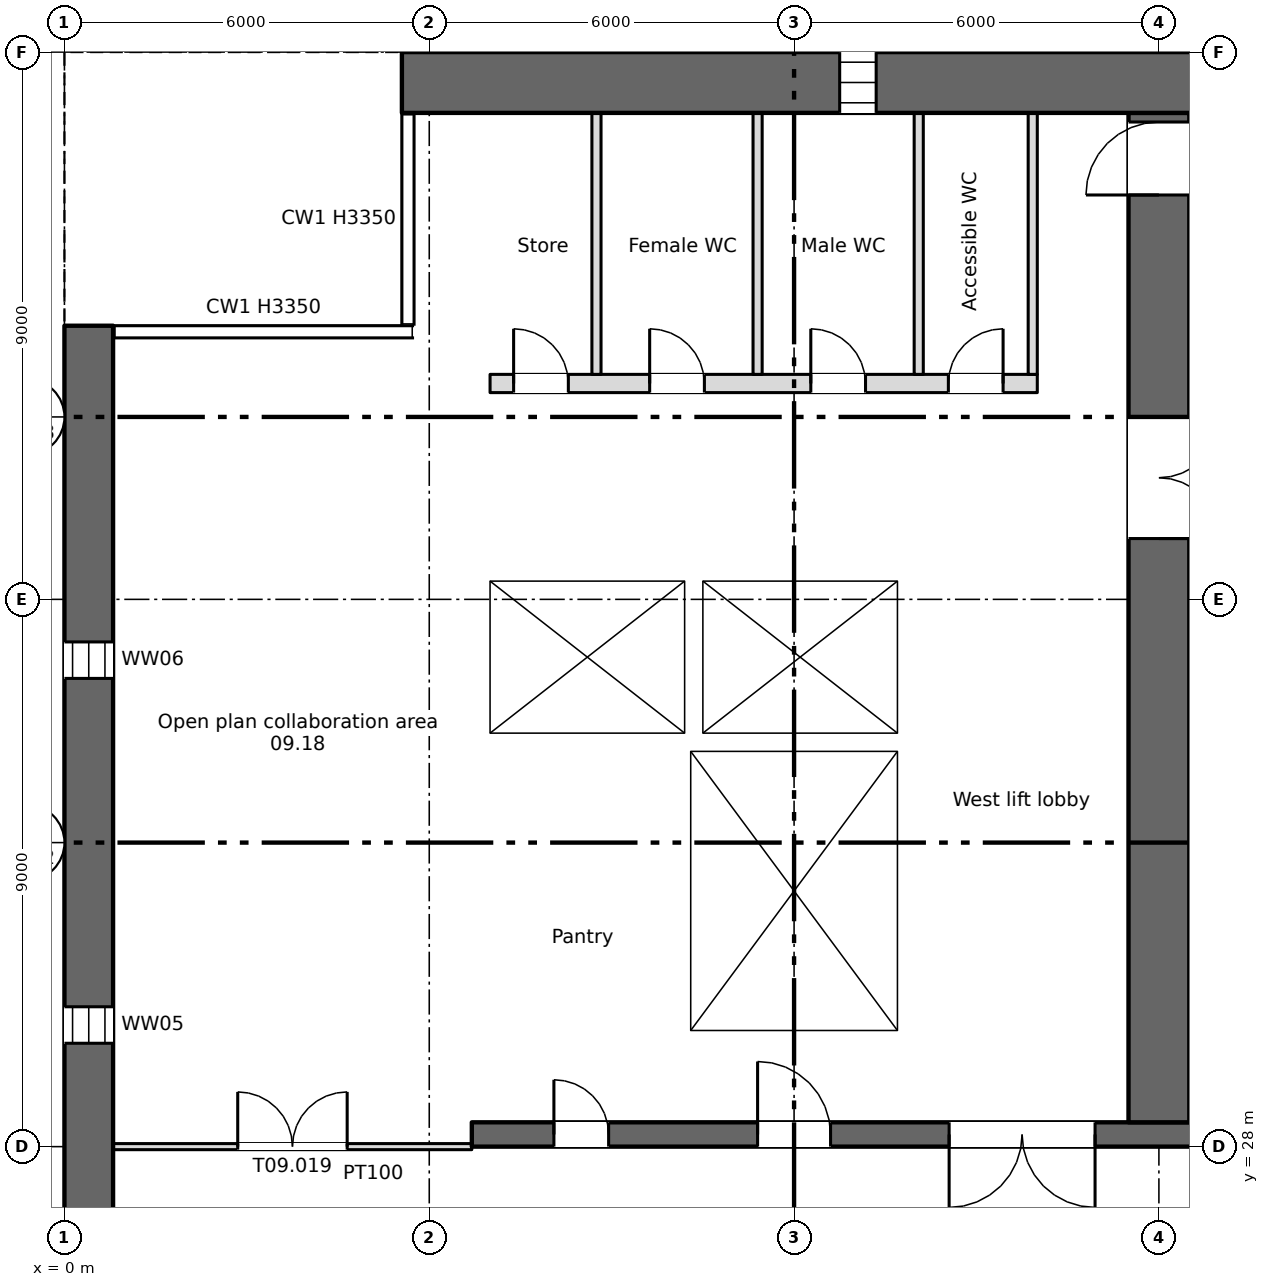
"""IFC4 building model, lengths in metres.
Left out: names, types, materials, properties, quantities, classifications, styles, units other than length and angle.
Written with IfcOpenShell. Run it as: python <this file> out.ifc"""

import sys

from ifc_helpers import new_model, si_unit, direction, frame, frame_2d, origin, place, context, subcontext, project, spatial, rectangle, extrude, element, fill, save


model = new_model("IFC4")
c1 = context("Model", 3, precision=1e-05, world=origin(), true_north=direction((0.0, 1.0)))
c2 = subcontext(c1, "Body", "Model", "MODEL_VIEW")
j1 = project(units=[si_unit("LENGTHUNIT", "METRE"), si_unit("PLANEANGLEUNIT", "RADIAN")], contexts=[c1])
p1 = place(None, origin())
s1 = spatial("IfcSite", under=j1, at=p1, CompositionType="ELEMENT")
p2 = place(p1, origin())
s2 = spatial("IfcBuilding", under=s1, at=p2, CompositionType="ELEMENT")
p3 = place(p2, frame((0.0, 0.0, 37.5)))
s3 = spatial("IfcBuildingStorey", under=s2, at=p3, CompositionType="ELEMENT", Elevation=37.5)
p4 = place(p3, frame((0.4, 4.5, 0.0), z_axis=(0.0, 0.0, 1.0), x_axis=(0.0, 1.0, 0.0)))
e1 = element("IfcWall", 1, at=p4, inside=s3, PredefinedType="SHEAR", context=c2, shape_type="SweptSolid", body=[
    extrude(rectangle(XDim=37.0, YDim=0.8, at=frame_2d((18.5, 0.0))), origin(), (0.0, 0.0, 1.0), 3.35),
])
p5 = place(p4, frame((1.2, 0.0, 0.6)))
e2 = element("IfcOpeningElement", 2, at=p5, cuts=e1, PredefinedType="OPENING", context=c2, shape_type="SweptSolid", body=[
    extrude(rectangle(XDim=0.6, YDim=2.4, at=frame_2d((0.3, 1.2))), frame((0.0, 0.41, 0.0), z_axis=(0.0, -1.0, 0.0), x_axis=(1.0, 0.0, 0.0)), (0.0, 0.0, 1.0), 0.82),
])
p6 = place(p4, frame((7.2, 0.0, 0.6)))
e3 = element("IfcOpeningElement", 3, at=p6, cuts=e1, PredefinedType="OPENING", context=c2, shape_type="SweptSolid", body=[
    extrude(rectangle(XDim=0.6, YDim=2.4, at=frame_2d((0.3, 1.2))), frame((0.0, 0.41, 0.0), z_axis=(0.0, -1.0, 0.0), x_axis=(1.0, 0.0, 0.0)), (0.0, 0.0, 1.0), 0.82),
])
p7 = place(p4, frame((13.2, 0.0, 0.6)))
e4 = element("IfcOpeningElement", 4, at=p7, cuts=e1, PredefinedType="OPENING", context=c2, shape_type="SweptSolid", body=[
    extrude(rectangle(XDim=0.6, YDim=2.4, at=frame_2d((0.3, 1.2))), frame((0.0, 0.41, 0.0), z_axis=(0.0, -1.0, 0.0), x_axis=(1.0, 0.0, 0.0)), (0.0, 0.0, 1.0), 0.82),
])
p8 = place(p4, frame((19.2, 0.0, 0.6)))
e5 = element("IfcOpeningElement", 5, at=p8, cuts=e1, PredefinedType="OPENING", context=c2, shape_type="SweptSolid", body=[
    extrude(rectangle(XDim=0.6, YDim=2.4, at=frame_2d((0.3, 1.2))), frame((0.0, 0.41, 0.0), z_axis=(0.0, -1.0, 0.0), x_axis=(1.0, 0.0, 0.0)), (0.0, 0.0, 1.0), 0.82),
])
p9 = place(p4, frame((25.2, 0.0, 0.6)))
e6 = element("IfcOpeningElement", 6, at=p9, cuts=e1, PredefinedType="OPENING", context=c2, shape_type="SweptSolid", body=[
    extrude(rectangle(XDim=0.6, YDim=2.4, at=frame_2d((0.3, 1.2))), frame((0.0, 0.41, 0.0), z_axis=(0.0, -1.0, 0.0), x_axis=(1.0, 0.0, 0.0)), (0.0, 0.0, 1.0), 0.82),
])
p10 = place(p4, frame((31.2, 0.0, 0.6)))
e7 = element("IfcOpeningElement", 7, at=p10, cuts=e1, PredefinedType="OPENING", context=c2, shape_type="SweptSolid", body=[
    extrude(rectangle(XDim=0.6, YDim=2.4, at=frame_2d((0.3, 1.2))), frame((0.0, 0.41, 0.0), z_axis=(0.0, -1.0, 0.0), x_axis=(1.0, 0.0, 0.0)), (0.0, 0.0, 1.0), 0.82),
])
p11 = place(p3, frame((5.55, 45.5, 0.0), z_axis=(0.0, 0.0, 1.0), x_axis=(1.0, 0.0, 0.0)))
e8 = element("IfcWall", 8, at=p11, inside=s3, PredefinedType="SHEAR", context=c2, shape_type="SweptSolid", body=[
    extrude(rectangle(XDim=66.9, YDim=1.0, at=frame_2d((33.45, 0.0))), origin(), (0.0, 0.0, 1.0), 3.35),
])
p12 = place(p11, frame((7.2, 0.0, 0.6)))
e9 = element("IfcOpeningElement", 9, at=p12, cuts=e8, PredefinedType="OPENING", context=c2, shape_type="SweptSolid", body=[
    extrude(rectangle(XDim=0.6, YDim=2.4, at=frame_2d((0.3, 1.2))), frame((0.0, 0.51, 0.0), z_axis=(0.0, -1.0, 0.0), x_axis=(1.0, 0.0, 0.0)), (0.0, 0.0, 1.0), 1.02),
])
p13 = place(p11, frame((61.2, 0.0, 0.6)))
e10 = element("IfcOpeningElement", 10, at=p13, cuts=e8, PredefinedType="OPENING", context=c2, shape_type="SweptSolid", body=[
    extrude(rectangle(XDim=0.6, YDim=2.4, at=frame_2d((0.3, 1.2))), frame((0.0, 0.51, 0.0), z_axis=(0.0, -1.0, 0.0), x_axis=(1.0, 0.0, 0.0)), (0.0, 0.0, 1.0), 1.02),
])
p14 = place(p3, frame((6.7, 28.2, 0.0), z_axis=(0.0, 0.0, 1.0), x_axis=(1.0, 0.0, 0.0)))
e11 = element("IfcWall", 11, at=p14, inside=s3, PredefinedType="SHEAR", context=c2, shape_type="SweptSolid", body=[
    extrude(rectangle(XDim=57.8, YDim=0.4, at=frame_2d((28.9, 0.0))), origin(), (0.0, 0.0, 1.0), 3.35),
])
p15 = place(p14, frame((12.062, 0.0, 0.0)))
e12 = element("IfcOpeningElement", 12, at=p15, cuts=e11, PredefinedType="OPENING", context=c2, shape_type="SweptSolid", body=[
    extrude(rectangle(XDim=0.9, YDim=2.1, at=frame_2d((0.45, 1.05))), frame((0.0, 0.21, 0.0), z_axis=(0.0, -1.0, 0.0), x_axis=(1.0, 0.0, 0.0)), (0.0, 0.0, 1.0), 0.42),
])
p16 = place(p14, frame((14.637, 0.0, 0.0)))
e13 = element("IfcOpeningElement", 13, at=p16, cuts=e11, PredefinedType="OPENING", context=c2, shape_type="SweptSolid", body=[
    extrude(rectangle(XDim=0.9, YDim=2.1, at=frame_2d((0.45, 1.05))), frame((0.0, 0.21, 0.0), z_axis=(0.0, -1.0, 0.0), x_axis=(1.0, 0.0, 0.0)), (0.0, 0.0, 1.0), 0.42),
])
p17 = place(p14, frame((49.062, 0.0, 0.0)))
e14 = element("IfcOpeningElement", 14, at=p17, cuts=e11, PredefinedType="OPENING", context=c2, shape_type="SweptSolid", body=[
    extrude(rectangle(XDim=0.9, YDim=2.1, at=frame_2d((0.45, 1.05))), frame((0.0, 0.21, 0.0), z_axis=(0.0, -1.0, 0.0), x_axis=(1.0, 0.0, 0.0)), (0.0, 0.0, 1.0), 0.42),
])
p18 = place(p14, frame((51.637, 0.0, 0.0)))
e15 = element("IfcOpeningElement", 15, at=p18, cuts=e11, PredefinedType="OPENING", context=c2, shape_type="SweptSolid", body=[
    extrude(rectangle(XDim=0.9, YDim=2.1, at=frame_2d((0.45, 1.05))), frame((0.0, 0.21, 0.0), z_axis=(0.0, -1.0, 0.0), x_axis=(1.0, 0.0, 0.0)), (0.0, 0.0, 1.0), 0.42),
])
p19 = place(p14, frame((1.35, 0.0, 0.0)))
e16 = element("IfcOpeningElement", 16, at=p19, cuts=e11, PredefinedType="OPENING", context=c2, shape_type="SweptSolid", body=[
    extrude(rectangle(XDim=0.9, YDim=2.1, at=frame_2d((0.45, 1.05))), frame((0.0, 0.21, 0.0), z_axis=(0.0, -1.0, 0.0), x_axis=(1.0, 0.0, 0.0)), (0.0, 0.0, 1.0), 0.42),
])
p20 = place(p14, frame((4.7, 0.0, 0.0)))
e17 = element("IfcOpeningElement", 17, at=p20, cuts=e11, PredefinedType="OPENING", context=c2, shape_type="SweptSolid", body=[
    extrude(rectangle(XDim=1.2, YDim=2.1, at=frame_2d((0.6, 1.05))), frame((0.0, 0.21, 0.0), z_axis=(0.0, -1.0, 0.0), x_axis=(1.0, 0.0, 0.0)), (0.0, 0.0, 1.0), 0.42),
])
p21 = place(p14, frame((31.7, 0.0, 0.0)))
e18 = element("IfcOpeningElement", 18, at=p21, cuts=e11, PredefinedType="OPENING", context=c2, shape_type="SweptSolid", body=[
    extrude(rectangle(XDim=1.2, YDim=2.1, at=frame_2d((0.6, 1.05))), frame((0.0, 0.21, 0.0), z_axis=(0.0, -1.0, 0.0), x_axis=(1.0, 0.0, 0.0)), (0.0, 0.0, 1.0), 0.42),
])
p22 = place(p14, frame((55.2, 0.0, 0.0)))
e19 = element("IfcOpeningElement", 19, at=p22, cuts=e11, PredefinedType="OPENING", context=c2, shape_type="SweptSolid", body=[
    extrude(rectangle(XDim=1.2, YDim=2.1, at=frame_2d((0.6, 1.05))), frame((0.0, 0.21, 0.0), z_axis=(0.0, -1.0, 0.0), x_axis=(1.0, 0.0, 0.0)), (0.0, 0.0, 1.0), 0.42),
])
p23 = place(p14, frame((21.7, 0.0, 0.0)))
e20 = element("IfcOpeningElement", 20, at=p23, cuts=e11, PredefinedType="OPENING", context=c2, shape_type="SweptSolid", body=[
    extrude(rectangle(XDim=1.2, YDim=2.1, at=frame_2d((0.6, 1.05))), frame((0.0, 0.21, 0.0), z_axis=(0.0, -1.0, 0.0), x_axis=(1.0, 0.0, 0.0)), (0.0, 0.0, 1.0), 0.42),
])
p24 = place(p14, frame((41.7, 0.0, 0.0)))
e21 = element("IfcOpeningElement", 21, at=p24, cuts=e11, PredefinedType="OPENING", context=c2, shape_type="SweptSolid", body=[
    extrude(rectangle(XDim=1.2, YDim=2.1, at=frame_2d((0.6, 1.05))), frame((0.0, 0.21, 0.0), z_axis=(0.0, -1.0, 0.0), x_axis=(1.0, 0.0, 0.0)), (0.0, 0.0, 1.0), 0.42),
])
p25 = place(p14, frame((24.85, 0.0, 0.0)))
e22 = element("IfcOpeningElement", 22, at=p25, cuts=e11, PredefinedType="OPENING", context=c2, shape_type="SweptSolid", body=[
    extrude(rectangle(XDim=2.4, YDim=2.1, at=frame_2d((1.2, 1.05))), frame((0.0, 0.21, 0.0), z_axis=(0.0, -1.0, 0.0), x_axis=(1.0, 0.0, 0.0)), (0.0, 0.0, 1.0), 0.42),
])
p26 = place(p14, frame((37.35, 0.0, 0.0)))
e23 = element("IfcOpeningElement", 23, at=p26, cuts=e11, PredefinedType="OPENING", context=c2, shape_type="SweptSolid", body=[
    extrude(rectangle(XDim=2.4, YDim=2.1, at=frame_2d((1.2, 1.05))), frame((0.0, 0.21, 0.0), z_axis=(0.0, -1.0, 0.0), x_axis=(1.0, 0.0, 0.0)), (0.0, 0.0, 1.0), 0.42),
])
p27 = place(p14, frame((7.85, 0.0, 0.0)))
e24 = element("IfcOpeningElement", 24, at=p27, cuts=e11, PredefinedType="OPENING", context=c2, shape_type="SweptSolid", body=[
    extrude(rectangle(XDim=2.4, YDim=2.1, at=frame_2d((1.2, 1.05))), frame((0.0, 0.21, 0.0), z_axis=(0.0, -1.0, 0.0), x_axis=(1.0, 0.0, 0.0)), (0.0, 0.0, 1.0), 0.42),
])
p28 = place(p14, frame((28.85, 0.0, 0.0)))
e25 = element("IfcOpeningElement", 25, at=p28, cuts=e11, PredefinedType="OPENING", context=c2, shape_type="SweptSolid", body=[
    extrude(rectangle(XDim=0.9, YDim=2.1, at=frame_2d((0.45, 1.05))), frame((0.0, 0.21, 0.0), z_axis=(0.0, -1.0, 0.0), x_axis=(1.0, 0.0, 0.0)), (0.0, 0.0, 1.0), 0.42),
])
p29 = place(p14, frame((34.85, 0.0, 0.0)))
e26 = element("IfcOpeningElement", 26, at=p29, cuts=e11, PredefinedType="OPENING", context=c2, shape_type="SweptSolid", body=[
    extrude(rectangle(XDim=0.9, YDim=2.1, at=frame_2d((0.45, 1.05))), frame((0.0, 0.21, 0.0), z_axis=(0.0, -1.0, 0.0), x_axis=(1.0, 0.0, 0.0)), (0.0, 0.0, 1.0), 0.42),
])
p30 = place(p3, frame((6.85, 28.4, 0.0), z_axis=(0.0, 0.0, 1.0), x_axis=(0.0, 1.0, 0.0)))
e27 = element("IfcWall", 27, at=p30, inside=s3, PredefinedType="SHEAR", context=c2, shape_type="SweptSolid", body=[
    extrude(rectangle(XDim=16.6, YDim=0.3, at=frame_2d((8.3, 0.0))), origin(), (0.0, 0.0, 1.0), 3.35),
])
p31 = place(p3, frame((18.0, 28.4, 0.0), z_axis=(0.0, 0.0, 1.0), x_axis=(0.0, 1.0, 0.0)))
e28 = element("IfcWall", 28, at=p31, inside=s3, PredefinedType="SHEAR", context=c2, shape_type="SweptSolid", body=[
    extrude(rectangle(XDim=16.6, YDim=1.0, at=frame_2d((8.3, 0.0))), origin(), (0.0, 0.0, 1.0), 3.35),
])
p32 = place(p31, frame((9.6, 0.0, 0.0)))
e29 = element("IfcOpeningElement", 29, at=p32, cuts=e28, PredefinedType="OPENING", context=c2, shape_type="SweptSolid", body=[
    extrude(rectangle(XDim=2.0, YDim=2.1, at=frame_2d((1.0, 1.05))), frame((0.0, 0.51, 0.0), z_axis=(0.0, -1.0, 0.0), x_axis=(1.0, 0.0, 0.0)), (0.0, 0.0, 1.0), 1.02),
])
p33 = place(p31, frame((15.25, 0.0, 0.0)))
e30 = element("IfcOpeningElement", 30, at=p33, cuts=e28, PredefinedType="OPENING", context=c2, shape_type="SweptSolid", body=[
    extrude(rectangle(XDim=1.2, YDim=2.1, at=frame_2d((0.6, 1.05))), frame((0.0, 0.51, 0.0), z_axis=(0.0, -1.0, 0.0), x_axis=(1.0, 0.0, 0.0)), (0.0, 0.0, 1.0), 1.02),
])
for number, where, z_axis, x_axis in (
    (31, (10.15, 28.4, 0.0), (0.0, 0.0, 1.0), (0.0, 1.0, 0.0)),
    (32, (13.85, 28.4, 0.0), (0.0, 0.0, 1.0), (0.0, 1.0, 0.0)),
):
    element("IfcWall", number, at=place(p3, frame(where, z_axis=z_axis, x_axis=x_axis)), inside=s3, PredefinedType="SHEAR", context=c2, shape_type="SweptSolid", body=[
        extrude(rectangle(XDim=6.1, YDim=0.3, at=frame_2d((3.05, 0.0))), origin(), (0.0, 0.0, 1.0), 3.35),
    ])
for number, where, z_axis, x_axis in (
    (33, (7.0, 34.65, 0.0), (0.0, 0.0, 1.0), (1.0, 0.0, 0.0)),
    (34, (7.0, 37.45, 0.0), (0.0, 0.0, 1.0), (1.0, 0.0, 0.0)),
):
    element("IfcWall", number, at=place(p3, frame(where, z_axis=z_axis, x_axis=x_axis)), inside=s3, PredefinedType="SHEAR", context=c2, shape_type="SweptSolid", body=[
        extrude(rectangle(XDim=7.0, YDim=0.3, at=frame_2d((3.5, 0.0))), origin(), (0.0, 0.0, 1.0), 3.35),
    ])
p34 = place(p3, frame((13.85, 34.8, 0.0), z_axis=(0.0, 0.0, 1.0), x_axis=(0.0, 1.0, 0.0)))
e35 = element("IfcWall", 35, at=p34, inside=s3, PredefinedType="SHEAR", context=c2, shape_type="SweptSolid", body=[
    extrude(rectangle(XDim=2.5, YDim=0.3, at=frame_2d((1.25, 0.0))), origin(), (0.0, 0.0, 1.0), 3.35),
])
p35 = place(p3, frame((7.0, 40.55, 0.0), z_axis=(0.0, 0.0, 1.0), x_axis=(1.0, 0.0, 0.0)))
e36 = element("IfcWall", 36, at=p35, inside=s3, PredefinedType="PARTITIONING", context=c2, shape_type="SweptSolid", body=[
    extrude(rectangle(XDim=9.0, YDim=0.3, at=frame_2d((4.5, 0.0))), origin(), (0.0, 0.0, 1.0), 3.35),
])
p36 = place(p35, frame((0.387, 0.0, 0.0)))
e37 = element("IfcOpeningElement", 37, at=p36, cuts=e36, PredefinedType="OPENING", context=c2, shape_type="SweptSolid", body=[
    extrude(rectangle(XDim=0.9, YDim=2.1, at=frame_2d((0.45, 1.05))), frame((0.0, 0.16, 0.0), z_axis=(0.0, -1.0, 0.0), x_axis=(1.0, 0.0, 0.0)), (0.0, 0.0, 1.0), 0.32),
])
p37 = place(p35, frame((2.625, 0.0, 0.0)))
e38 = element("IfcOpeningElement", 38, at=p37, cuts=e36, PredefinedType="OPENING", context=c2, shape_type="SweptSolid", body=[
    extrude(rectangle(XDim=0.9, YDim=2.1, at=frame_2d((0.45, 1.05))), frame((0.0, 0.16, 0.0), z_axis=(0.0, -1.0, 0.0), x_axis=(1.0, 0.0, 0.0)), (0.0, 0.0, 1.0), 0.32),
])
p38 = place(p35, frame((5.275, 0.0, 0.0)))
e39 = element("IfcOpeningElement", 39, at=p38, cuts=e36, PredefinedType="OPENING", context=c2, shape_type="SweptSolid", body=[
    extrude(rectangle(XDim=0.9, YDim=2.1, at=frame_2d((0.45, 1.05))), frame((0.0, 0.16, 0.0), z_axis=(0.0, -1.0, 0.0), x_axis=(1.0, 0.0, 0.0)), (0.0, 0.0, 1.0), 0.32),
])
p39 = place(p35, frame((7.538, 0.0, 0.0)))
e40 = element("IfcOpeningElement", 40, at=p39, cuts=e36, PredefinedType="OPENING", context=c2, shape_type="SweptSolid", body=[
    extrude(rectangle(XDim=0.9, YDim=2.1, at=frame_2d((0.45, 1.05))), frame((0.0, 0.16, 0.0), z_axis=(0.0, -1.0, 0.0), x_axis=(1.0, 0.0, 0.0)), (0.0, 0.0, 1.0), 0.32),
])
p40 = place(p3, frame((10.35, 34.8, 0.0), z_axis=(0.0, 0.0, 1.0), x_axis=(0.0, 1.0, 0.0)))
e41 = element("IfcWall", 41, at=p40, inside=s3, PredefinedType="SHEAR", context=c2, shape_type="SweptSolid", body=[
    extrude(rectangle(XDim=2.5, YDim=0.3, at=frame_2d((1.25, 0.0))), origin(), (0.0, 0.0, 1.0), 3.35),
])
for number, where, z_axis, x_axis in (
    (42, (15.925, 40.7, 0.0), (0.0, 0.0, 1.0), (0.0, 1.0, 0.0)),
    (43, (8.75, 40.7, 0.0), (0.0, 0.0, 1.0), (0.0, 1.0, 0.0)),
    (44, (11.4, 40.7, 0.0), (0.0, 0.0, 1.0), (0.0, 1.0, 0.0)),
    (45, (14.05, 40.7, 0.0), (0.0, 0.0, 1.0), (0.0, 1.0, 0.0)),
):
    element("IfcWall", number, at=place(p3, frame(where, z_axis=z_axis, x_axis=x_axis)), inside=s3, PredefinedType="PARTITIONING", context=c2, shape_type="SweptSolid", body=[
        extrude(rectangle(XDim=4.3, YDim=0.15, at=frame_2d((2.15, 0.0))), origin(), (0.0, 0.0, 1.0), 3.35),
    ])
p41 = place(p3, frame((0.8, 28.0, 0.0), z_axis=(0.0, 0.0, 1.0), x_axis=(1.0, 0.0, 0.0)))
e46 = element("IfcWall", 46, at=p41, inside=s3, PredefinedType="PARTITIONING", context=c2, shape_type="SweptSolid", body=[
    extrude(rectangle(XDim=5.9, YDim=0.1, at=frame_2d((2.95, 0.0))), origin(), (0.0, 0.0, 1.0), 3.35),
])
p42 = place(p41, frame((2.05, 0.0, 0.0)))
e47 = element("IfcOpeningElement", 47, at=p42, cuts=e46, PredefinedType="OPENING", context=c2, shape_type="SweptSolid", body=[
    extrude(rectangle(XDim=1.8, YDim=2.1, at=frame_2d((0.9, 1.05))), frame((0.0, 0.06, 0.0), z_axis=(0.0, -1.0, 0.0), x_axis=(1.0, 0.0, 0.0)), (0.0, 0.0, 1.0), 0.12),
])
p43 = place(p12, origin())
e48 = element("IfcWindow", 48, at=p43, inside=s3, PartitioningType="SINGLE_PANEL", PredefinedType="WINDOW", context=c2, shape_type="SweptSolid", body=[
    extrude(rectangle(XDim=0.6, YDim=2.4, at=frame_2d((0.3, 1.2))), frame((0.0, 0.03, 0.0), z_axis=(0.0, -1.0, 0.0), x_axis=(1.0, 0.0, 0.0)), (0.0, 0.0, 1.0), 0.06),
])
fill(e9, e48)
p44 = place(p9, origin())
e49 = element("IfcWindow", 49, at=p44, inside=s3, PartitioningType="SINGLE_PANEL", PredefinedType="WINDOW", context=c2, shape_type="SweptSolid", body=[
    extrude(rectangle(XDim=0.6, YDim=2.4, at=frame_2d((0.3, 1.2))), frame((0.0, 0.03, 0.0), z_axis=(0.0, -1.0, 0.0), x_axis=(1.0, 0.0, 0.0)), (0.0, 0.0, 1.0), 0.06),
])
fill(e6, e49)
p45 = place(p10, origin())
e50 = element("IfcWindow", 50, at=p45, inside=s3, PartitioningType="SINGLE_PANEL", PredefinedType="WINDOW", context=c2, shape_type="SweptSolid", body=[
    extrude(rectangle(XDim=0.6, YDim=2.4, at=frame_2d((0.3, 1.2))), frame((0.0, 0.03, 0.0), z_axis=(0.0, -1.0, 0.0), x_axis=(1.0, 0.0, 0.0)), (0.0, 0.0, 1.0), 0.06),
])
fill(e7, e50)
p46 = place(p19, origin())
e51 = element("IfcDoor", 51, at=p46, inside=s3, OperationType="SINGLE_SWING_LEFT", PredefinedType="DOOR", context=c2, shape_type="SweptSolid", body=[
    extrude(rectangle(XDim=0.9, YDim=2.1, at=frame_2d((0.45, 1.05))), frame((0.0, 0.025, 0.0), z_axis=(0.0, -1.0, 0.0), x_axis=(1.0, 0.0, 0.0)), (0.0, 0.0, 1.0), 0.05),
])
fill(e16, e51)
p47 = place(p36, origin())
e52 = element("IfcDoor", 52, at=p47, inside=s3, OperationType="SINGLE_SWING_LEFT", PredefinedType="DOOR", context=c2, shape_type="SweptSolid", body=[
    extrude(rectangle(XDim=0.9, YDim=2.1, at=frame_2d((0.45, 1.05))), frame((0.0, 0.025, 0.0), z_axis=(0.0, -1.0, 0.0), x_axis=(1.0, 0.0, 0.0)), (0.0, 0.0, 1.0), 0.05),
])
fill(e37, e52)
p48 = place(p37, origin())
e53 = element("IfcDoor", 53, at=p48, inside=s3, OperationType="SINGLE_SWING_LEFT", PredefinedType="DOOR", context=c2, shape_type="SweptSolid", body=[
    extrude(rectangle(XDim=0.9, YDim=2.1, at=frame_2d((0.45, 1.05))), frame((0.0, 0.025, 0.0), z_axis=(0.0, -1.0, 0.0), x_axis=(1.0, 0.0, 0.0)), (0.0, 0.0, 1.0), 0.05),
])
fill(e38, e53)
p49 = place(p38, origin())
e54 = element("IfcDoor", 54, at=p49, inside=s3, OperationType="SINGLE_SWING_LEFT", PredefinedType="DOOR", context=c2, shape_type="SweptSolid", body=[
    extrude(rectangle(XDim=0.9, YDim=2.1, at=frame_2d((0.45, 1.05))), frame((0.0, 0.025, 0.0), z_axis=(0.0, -1.0, 0.0), x_axis=(1.0, 0.0, 0.0)), (0.0, 0.0, 1.0), 0.05),
])
fill(e39, e54)
p50 = place(p39, origin())
e55 = element("IfcDoor", 55, at=p50, inside=s3, OperationType="SINGLE_SWING_RIGHT", PredefinedType="DOOR", context=c2, shape_type="SweptSolid", body=[
    extrude(rectangle(XDim=0.9, YDim=2.1, at=frame_2d((0.45, 1.05))), frame((0.0, 0.025, 0.0), z_axis=(0.0, -1.0, 0.0), x_axis=(1.0, 0.0, 0.0)), (0.0, 0.0, 1.0), 0.05),
])
fill(e40, e55)
p51 = place(p20, origin())
e56 = element("IfcDoor", 56, at=p51, inside=s3, OperationType="SINGLE_SWING_LEFT", PredefinedType="DOOR", context=c2, shape_type="SweptSolid", body=[
    extrude(rectangle(XDim=1.2, YDim=2.1, at=frame_2d((0.6, 1.05))), frame((0.0, 0.025, 0.0), z_axis=(0.0, -1.0, 0.0), x_axis=(1.0, 0.0, 0.0)), (0.0, 0.0, 1.0), 0.05),
])
fill(e17, e56)
p52 = place(p27, origin())
e57 = element("IfcDoor", 57, at=p52, inside=s3, OperationType="DOUBLE_DOOR_SINGLE_SWING", PredefinedType="DOOR", context=c2, shape_type="SweptSolid", body=[
    extrude(rectangle(XDim=2.4, YDim=2.1, at=frame_2d((1.2, 1.05))), frame((0.0, 0.025, 0.0), z_axis=(0.0, -1.0, 0.0), x_axis=(1.0, 0.0, 0.0)), (0.0, 0.0, 1.0), 0.05),
])
fill(e24, e57)
p53 = place(p32, origin())
e58 = element("IfcDoor", 58, at=p53, inside=s3, OperationType="DOUBLE_DOOR_SINGLE_SWING", PredefinedType="DOOR", context=c2, shape_type="SweptSolid", body=[
    extrude(rectangle(XDim=2.0, YDim=2.1, at=frame_2d((1.0, 1.05))), frame((0.0, 0.025, 0.0), z_axis=(0.0, -1.0, 0.0), x_axis=(1.0, 0.0, 0.0)), (0.0, 0.0, 1.0), 0.05),
])
fill(e29, e58)
p54 = place(p33, origin())
e59 = element("IfcDoor", 59, at=p54, inside=s3, OperationType="SINGLE_SWING_LEFT", PredefinedType="DOOR", context=c2, shape_type="SweptSolid", body=[
    extrude(rectangle(XDim=1.2, YDim=2.1, at=frame_2d((0.6, 1.05))), frame((0.0, 0.025, 0.0), z_axis=(0.0, -1.0, 0.0), x_axis=(1.0, 0.0, 0.0)), (0.0, 0.0, 1.0), 0.05),
])
fill(e30, e59)
p55 = place(p42, origin())
e60 = element("IfcDoor", 60, at=p55, inside=s3, OperationType="DOUBLE_DOOR_SINGLE_SWING", PredefinedType="DOOR", context=c2, shape_type="SweptSolid", body=[
    extrude(rectangle(XDim=1.8, YDim=2.1, at=frame_2d((0.9, 1.05))), frame((0.0, 0.025, 0.0), z_axis=(0.0, -1.0, 0.0), x_axis=(1.0, 0.0, 0.0)), (0.0, 0.0, 1.0), 0.05),
])
fill(e47, e60)
save(model, sys.argv[1])
